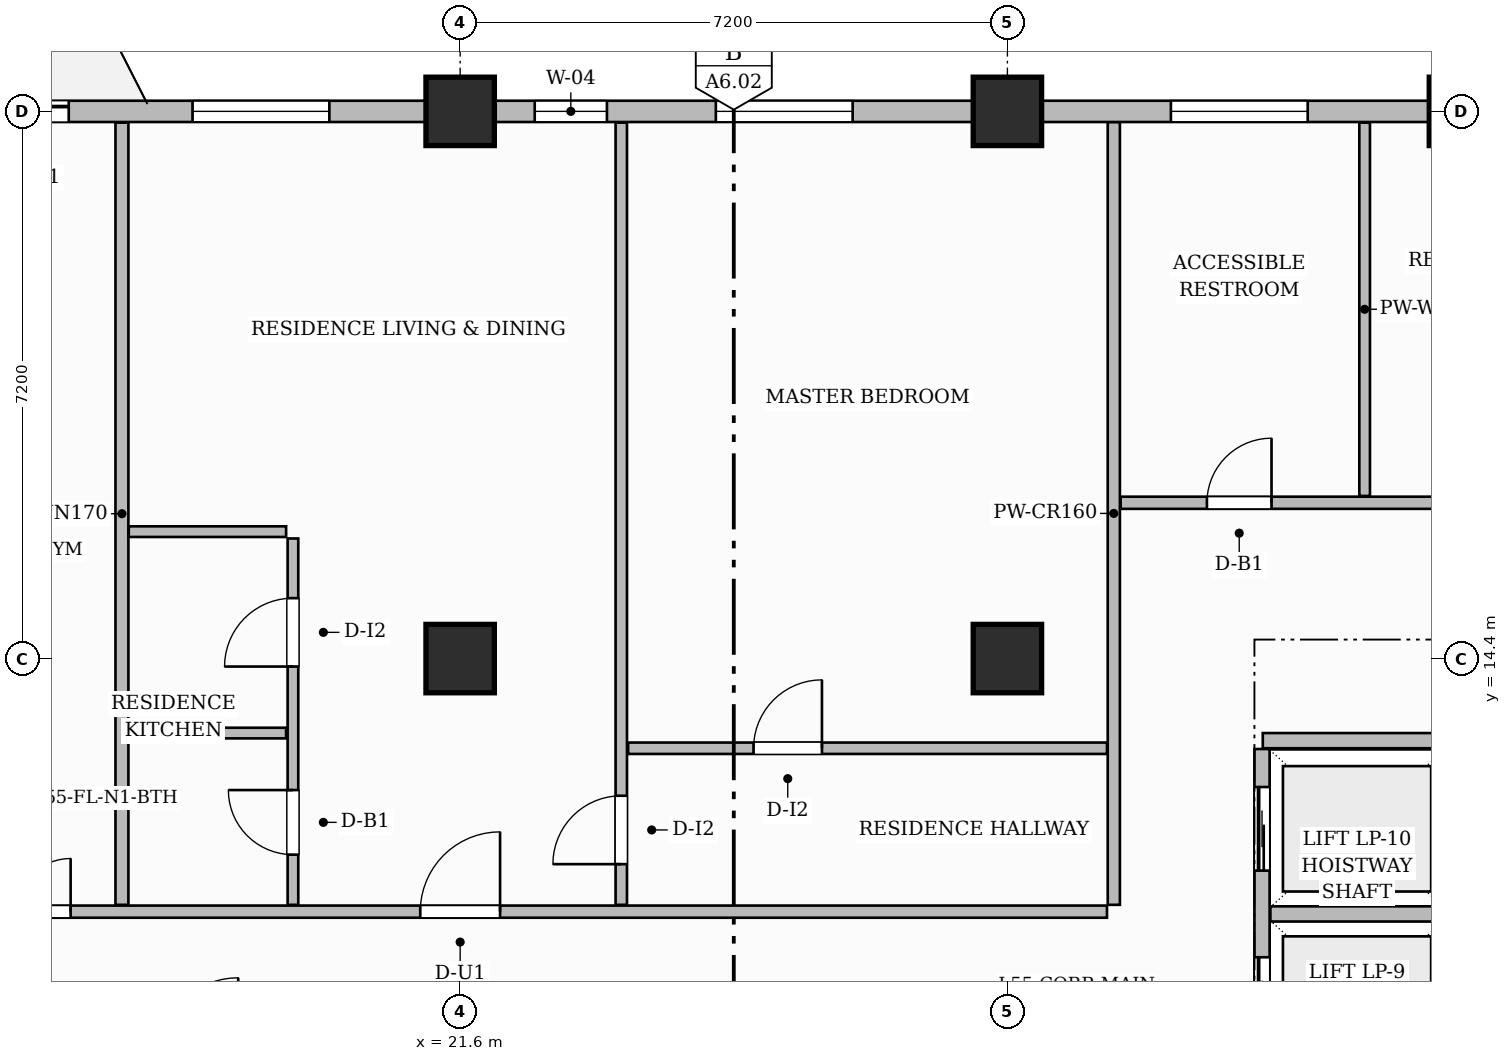
"""IFC4 building model, lengths in metres.
Left out: names, types, materials, properties, quantities, classifications, styles, units other than length and angle.
Written with IfcOpenShell. Run it as: python <this file> out.ifc"""

import sys

from ifc_helpers import new_model, si_unit, direction, frame, frame_2d, origin, origin_2d, place, context, subcontext, project, spatial, rectangle, extrude, source, transform, mapped, element, fill, save


model = new_model("IFC4")
c1 = context("Model", 3, precision=1e-05, world=origin(), true_north=direction((0.0, 1.0)))
c2 = subcontext(c1, "Body", "Model", "MODEL_VIEW")
j1 = project(units=[si_unit("LENGTHUNIT", "METRE"), si_unit("PLANEANGLEUNIT", "RADIAN")], contexts=[c1])
p1 = place(None, origin())
s1 = spatial("IfcSite", under=j1, at=p1, CompositionType="ELEMENT")
p2 = place(p1, origin())
s2 = spatial("IfcBuilding", under=s1, at=p2, CompositionType="ELEMENT")
p3 = place(p2, frame((0.0, 0.0, 221.15)))
s3 = spatial("IfcBuildingStorey", under=s2, at=p3, CompositionType="ELEMENT", Elevation=221.15)
m1 = source(origin(), c2, "Body", "SweptSolid", [
    extrude(rectangle(XDim=0.9, YDim=0.9, at=origin_2d()), origin(), (0.0, 0.0, 1.0), 3.85),
])
for number, where, z_axis, x_axis in (
    (1, (21.6, 14.4, 0.0), (0.0, 0.0, 1.0), (1.0, 0.0, 0.0)),
    (2, (21.6, 21.6, 0.0), (0.0, 0.0, 1.0), (1.0, 0.0, 0.0)),
    (3, (28.8, 14.4, 0.0), (0.0, 0.0, 1.0), (1.0, 0.0, 0.0)),
    (4, (28.8, 21.6, 0.0), (0.0, 0.0, 1.0), (1.0, 0.0, 0.0)),
    (5, (34.8, 21.6, 0.0), (0.0, 0.0, 1.0), (1.0, 0.0, 0.0)),
):
    element("IfcColumn", number, at=place(p3, frame(where, z_axis=z_axis, x_axis=x_axis)), inside=s3, PredefinedType="COLUMN", context=c2, shape_type="MappedRepresentation", body=[
        mapped(m1, transform((0.0, 0.0, 0.0), scale=1.0)),
    ])
p4 = place(p3, frame((32.16, 13.32, 0.0), z_axis=(0.0, 0.0, 1.0), x_axis=(1.0, 0.0, 0.0)))
e6 = element("IfcWall", 6, at=p4, inside=s3, PredefinedType="PARTITIONING", context=c2, shape_type="SweptSolid", body=[
    extrude(rectangle(XDim=2.36, YDim=0.2, at=frame_2d((1.18, 0.0))), origin(), (0.0, 0.0, 1.0), 3.6),
])
p5 = place(p3, frame((32.15, 4.39, 0.0), z_axis=(0.0, 0.0, 1.0), x_axis=(0.0, 1.0, 0.0)))
e7 = element("IfcWall", 7, at=p5, inside=s3, PredefinedType="PARTITIONING", context=c2, shape_type="SweptSolid", body=[
    extrude(rectangle(XDim=8.82, YDim=0.2, at=frame_2d((4.41, 0.0))), origin(), (0.0, 0.0, 1.0), 3.6),
])
p6 = place(p5, frame((0.5, 0.0, 0.0)))
e8 = element("IfcOpeningElement", 8, at=p6, cuts=e7, PredefinedType="OPENING", context=c2, shape_type="SweptSolid", body=[
    extrude(rectangle(XDim=1.1, YDim=2.2, at=frame_2d((0.55, 1.1))), frame((0.0, 0.11, 0.0), z_axis=(0.0, -1.0, 0.0), x_axis=(1.0, 0.0, 0.0)), (0.0, 0.0, 1.0), 0.22),
])
p7 = place(p5, frame((2.74, 0.0, 0.0)))
e9 = element("IfcOpeningElement", 9, at=p7, cuts=e7, PredefinedType="OPENING", context=c2, shape_type="SweptSolid", body=[
    extrude(rectangle(XDim=1.1, YDim=2.2, at=frame_2d((0.55, 1.1))), frame((0.0, 0.11, 0.0), z_axis=(0.0, -1.0, 0.0), x_axis=(1.0, 0.0, 0.0)), (0.0, 0.0, 1.0), 0.22),
])
p8 = place(p5, frame((4.98, 0.0, 0.0)))
e10 = element("IfcOpeningElement", 10, at=p8, cuts=e7, PredefinedType="OPENING", context=c2, shape_type="SweptSolid", body=[
    extrude(rectangle(XDim=1.1, YDim=2.2, at=frame_2d((0.55, 1.1))), frame((0.0, 0.11, 0.0), z_axis=(0.0, -1.0, 0.0), x_axis=(1.0, 0.0, 0.0)), (0.0, 0.0, 1.0), 0.22),
])
p9 = place(p5, frame((7.22, 0.0, 0.0)))
e11 = element("IfcOpeningElement", 11, at=p9, cuts=e7, PredefinedType="OPENING", context=c2, shape_type="SweptSolid", body=[
    extrude(rectangle(XDim=1.1, YDim=2.2, at=frame_2d((0.55, 1.1))), frame((0.0, 0.11, 0.0), z_axis=(0.0, -1.0, 0.0), x_axis=(1.0, 0.0, 0.0)), (0.0, 0.0, 1.0), 0.22),
])
p10 = place(p3, frame((32.26, 11.04, 0.0), z_axis=(0.0, 0.0, 1.0), x_axis=(1.0, 0.0, 0.0)))
e12 = element("IfcWall", 12, at=p10, inside=s3, PredefinedType="PARTITIONING", context=c2, shape_type="SweptSolid", body=[
    extrude(rectangle(XDim=2.23, YDim=0.2, at=frame_2d((1.115, 0.0))), origin(), (0.0, 0.0, 1.0), 3.6),
])
p11 = place(p3, frame((14.548, 11.07, 0.0), z_axis=(0.0, 0.0, 1.0), x_axis=(1.0, 0.0, 0.0)))
e13 = element("IfcWall", 13, at=p11, inside=s3, PredefinedType="PARTITIONING", context=c2, shape_type="SweptSolid", body=[
    extrude(rectangle(XDim=15.562, YDim=0.16, at=frame_2d((7.781, 0.0))), origin(), (0.0, 0.0, 1.0), 3.6),
])
p12 = place(p11, frame((0.527, 0.0, 0.0)))
e14 = element("IfcOpeningElement", 14, at=p12, cuts=e13, PredefinedType="OPENING", context=c2, shape_type="SweptSolid", body=[
    extrude(rectangle(XDim=1.4, YDim=2.35, at=frame_2d((0.7, 1.175))), frame((0.0, 0.09, 0.0), z_axis=(0.0, -1.0, 0.0), x_axis=(1.0, 0.0, 0.0)), (0.0, 0.0, 1.0), 0.18),
])
p13 = place(p11, frame((6.527, 0.0, 0.0)))
e15 = element("IfcOpeningElement", 15, at=p13, cuts=e13, PredefinedType="OPENING", context=c2, shape_type="SweptSolid", body=[
    extrude(rectangle(XDim=1.05, YDim=2.25, at=frame_2d((0.525, 1.125))), frame((0.0, 0.09, 0.0), z_axis=(0.0, -1.0, 0.0), x_axis=(1.0, 0.0, 0.0)), (0.0, 0.0, 1.0), 0.18),
])
p14 = place(p3, frame((30.2, 11.16, 0.0), z_axis=(0.0, 0.0, 1.0), x_axis=(0.0, 1.0, 0.0)))
e16 = element("IfcWall", 16, at=p14, inside=s3, PredefinedType="PARTITIONING", context=c2, shape_type="SweptSolid", body=[
    extrude(rectangle(XDim=10.3, YDim=0.16, at=frame_2d((5.15, 0.0))), origin(), (0.0, 0.0, 1.0), 3.6),
])
p15 = place(p3, frame((30.29, 16.45, 0.0), z_axis=(0.0, 0.0, 1.0), x_axis=(1.0, 0.0, 0.0)))
e17 = element("IfcWall", 17, at=p15, inside=s3, PredefinedType="PARTITIONING", context=c2, shape_type="SweptSolid", body=[
    extrude(rectangle(XDim=19.37, YDim=0.16, at=frame_2d((9.685, 0.0))), origin(), (0.0, 0.0, 1.0), 3.6),
])
p16 = place(p15, frame((1.135, 0.0, 0.0)))
e18 = element("IfcOpeningElement", 18, at=p16, cuts=e17, PredefinedType="OPENING", context=c2, shape_type="SweptSolid", body=[
    extrude(rectangle(XDim=0.85, YDim=2.1, at=frame_2d((0.425, 1.05))), frame((0.0, 0.09, 0.0), z_axis=(0.0, -1.0, 0.0), x_axis=(1.0, 0.0, 0.0)), (0.0, 0.0, 1.0), 0.18),
])
p17 = place(p15, frame((5.71, 0.0, 0.0)))
e19 = element("IfcOpeningElement", 19, at=p17, cuts=e17, PredefinedType="OPENING", context=c2, shape_type="SweptSolid", body=[
    extrude(rectangle(XDim=0.9, YDim=2.15, at=frame_2d((0.45, 1.075))), frame((0.0, 0.09, 0.0), z_axis=(0.0, -1.0, 0.0), x_axis=(1.0, 0.0, 0.0)), (0.0, 0.0, 1.0), 0.18),
])
p18 = place(p15, frame((10.635, 0.0, 0.0)))
e20 = element("IfcOpeningElement", 20, at=p18, cuts=e17, PredefinedType="OPENING", context=c2, shape_type="SweptSolid", body=[
    extrude(rectangle(XDim=0.95, YDim=2.15, at=frame_2d((0.475, 1.075))), frame((0.0, 0.09, 0.0), z_axis=(0.0, -1.0, 0.0), x_axis=(1.0, 0.0, 0.0)), (0.0, 0.0, 1.0), 0.18),
])
p19 = place(p15, frame((16.235, 0.0, 0.0)))
e21 = element("IfcOpeningElement", 21, at=p19, cuts=e17, PredefinedType="OPENING", context=c2, shape_type="SweptSolid", body=[
    extrude(rectangle(XDim=0.95, YDim=2.15, at=frame_2d((0.475, 1.075))), frame((0.0, 0.09, 0.0), z_axis=(0.0, -1.0, 0.0), x_axis=(1.0, 0.0, 0.0)), (0.0, 0.0, 1.0), 0.18),
])
p20 = place(p3, frame((33.5, 16.54, 0.0), z_axis=(0.0, 0.0, 1.0), x_axis=(0.0, 1.0, 0.0)))
e22 = element("IfcWall", 22, at=p20, inside=s3, PredefinedType="PARTITIONING", context=c2, shape_type="SweptSolid", body=[
    extrude(rectangle(XDim=4.912, YDim=0.14, at=frame_2d((2.456, 0.0))), origin(), (0.0, 0.0, 1.0), 3.6),
])
p21 = place(p3, frame((17.15, 11.16, 0.0), z_axis=(0.0, 0.0, 1.0), x_axis=(0.0, 1.0, 0.0)))
e23 = element("IfcWall", 23, at=p21, inside=s3, PredefinedType="PARTITIONING", context=c2, shape_type="SweptSolid", body=[
    extrude(rectangle(XDim=10.292, YDim=0.17, at=frame_2d((5.146, 0.0))), origin(), (0.0, 0.0, 1.0), 3.6),
])
p22 = place(p3, frame((19.4, 11.16, 0.0), z_axis=(0.0, 0.0, 1.0), x_axis=(0.0, 1.0, 0.0)))
e24 = element("IfcWall", 24, at=p22, inside=s3, PredefinedType="PARTITIONING", context=c2, shape_type="SweptSolid", body=[
    extrude(rectangle(XDim=4.82, YDim=0.14, at=frame_2d((2.41, 0.0))), origin(), (0.0, 0.0, 1.0), 3.6),
])
p23 = place(p22, frame((0.66, 0.0, 0.0)))
e25 = element("IfcOpeningElement", 25, at=p23, cuts=e24, PredefinedType="OPENING", context=c2, shape_type="SweptSolid", body=[
    extrude(rectangle(XDim=0.85, YDim=2.1, at=frame_2d((0.425, 1.05))), frame((0.0, 0.08, 0.0), z_axis=(0.0, -1.0, 0.0), x_axis=(1.0, 0.0, 0.0)), (0.0, 0.0, 1.0), 0.16),
])
p24 = place(p22, frame((3.135, 0.0, 0.0)))
e26 = element("IfcOpeningElement", 26, at=p24, cuts=e24, PredefinedType="OPENING", context=c2, shape_type="SweptSolid", body=[
    extrude(rectangle(XDim=0.9, YDim=2.15, at=frame_2d((0.45, 1.075))), frame((0.0, 0.08, 0.0), z_axis=(0.0, -1.0, 0.0), x_axis=(1.0, 0.0, 0.0)), (0.0, 0.0, 1.0), 0.16),
])
for number, where, z_axis, x_axis in (
    (27, (17.24, 13.42, 0.0), (0.0, 0.0, 1.0), (1.0, 0.0, 0.0)),
    (28, (17.24, 16.07, 0.0), (0.0, 0.0, 1.0), (1.0, 0.0, 0.0)),
):
    element("IfcWall", number, at=place(p3, frame(where, z_axis=z_axis, x_axis=x_axis)), inside=s3, PredefinedType="PARTITIONING", context=c2, shape_type="SweptSolid", body=[
        extrude(rectangle(XDim=2.07, YDim=0.14, at=frame_2d((1.035, 0.0))), origin(), (0.0, 0.0, 1.0), 3.6),
    ])
p25 = place(p3, frame((23.72, 11.16, 0.0), z_axis=(0.0, 0.0, 1.0), x_axis=(0.0, 1.0, 0.0)))
e29 = element("IfcWall", 29, at=p25, inside=s3, PredefinedType="PARTITIONING", context=c2, shape_type="SweptSolid", body=[
    extrude(rectangle(XDim=10.292, YDim=0.15, at=frame_2d((5.146, 0.0))), origin(), (0.0, 0.0, 1.0), 3.6),
])
p26 = place(p25, frame((0.535, 0.0, 0.0)))
e30 = element("IfcOpeningElement", 30, at=p26, cuts=e29, PredefinedType="OPENING", context=c2, shape_type="SweptSolid", body=[
    extrude(rectangle(XDim=0.9, YDim=2.15, at=frame_2d((0.45, 1.075))), frame((0.0, 0.085, 0.0), z_axis=(0.0, -1.0, 0.0), x_axis=(1.0, 0.0, 0.0)), (0.0, 0.0, 1.0), 0.17),
])
p27 = place(p3, frame((23.81, 13.22, 0.0), z_axis=(0.0, 0.0, 1.0), x_axis=(1.0, 0.0, 0.0)))
e31 = element("IfcWall", 31, at=p27, inside=s3, PredefinedType="PARTITIONING", context=c2, shape_type="SweptSolid", body=[
    extrude(rectangle(XDim=6.3, YDim=0.15, at=frame_2d((3.15, 0.0))), origin(), (0.0, 0.0, 1.0), 3.6),
])
p28 = place(p27, frame((1.65, 0.0, 0.0)))
e32 = element("IfcOpeningElement", 32, at=p28, cuts=e31, PredefinedType="OPENING", context=c2, shape_type="SweptSolid", body=[
    extrude(rectangle(XDim=0.9, YDim=2.15, at=frame_2d((0.45, 1.075))), frame((0.0, 0.085, 0.0), z_axis=(0.0, -1.0, 0.0), x_axis=(1.0, 0.0, 0.0)), (0.0, 0.0, 1.0), 0.17),
])
p29 = place(p3, frame((14.4, 21.6, 0.0), z_axis=(0.0, 0.0, 1.0), x_axis=(1.0, 0.0, 0.0)))
e33 = element("IfcWall", 33, at=p29, inside=s3, PredefinedType="SOLIDWALL", context=c2, shape_type="SweptSolid", body=[
    extrude(rectangle(XDim=35.4, YDim=0.28, at=frame_2d((17.7, 0.0))), origin(), (0.0, 0.0, 1.0), 3.135),
])
p30 = place(p29, frame((0.85, 0.0, 0.0)))
e34 = element("IfcOpeningElement", 34, at=p30, cuts=e33, PredefinedType="OPENING", context=c2, shape_type="SweptSolid", body=[
    extrude(rectangle(XDim=1.2, YDim=2.2, at=frame_2d((0.6, 1.1))), frame((0.0, 0.15, 0.0), z_axis=(0.0, -1.0, 0.0), x_axis=(1.0, 0.0, 0.0)), (0.0, 0.0, 1.0), 0.3),
])
p31 = place(p29, frame((3.679, 0.0, 0.8)))
e35 = element("IfcOpeningElement", 35, at=p31, cuts=e33, PredefinedType="OPENING", context=c2, shape_type="SweptSolid", body=[
    extrude(rectangle(XDim=1.8, YDim=1.85, at=frame_2d((0.9, 0.925))), frame((0.0, 0.15, 0.0), z_axis=(0.0, -1.0, 0.0), x_axis=(1.0, 0.0, 0.0)), (0.0, 0.0, 1.0), 0.3),
])
p32 = place(p29, frame((8.181, 0.0, 0.8)))
e36 = element("IfcOpeningElement", 36, at=p32, cuts=e33, PredefinedType="OPENING", context=c2, shape_type="SweptSolid", body=[
    extrude(rectangle(XDim=0.95, YDim=1.75, at=frame_2d((0.475, 0.875))), frame((0.0, 0.15, 0.0), z_axis=(0.0, -1.0, 0.0), x_axis=(1.0, 0.0, 0.0)), (0.0, 0.0, 1.0), 0.3),
])
p33 = place(p29, frame((10.564, 0.0, 0.8)))
e37 = element("IfcOpeningElement", 37, at=p33, cuts=e33, PredefinedType="OPENING", context=c2, shape_type="SweptSolid", body=[
    extrude(rectangle(XDim=1.8, YDim=1.85, at=frame_2d((0.9, 0.925))), frame((0.0, 0.15, 0.0), z_axis=(0.0, -1.0, 0.0), x_axis=(1.0, 0.0, 0.0)), (0.0, 0.0, 1.0), 0.3),
])
p34 = place(p29, frame((16.551, 0.0, 0.8)))
e38 = element("IfcOpeningElement", 38, at=p34, cuts=e33, PredefinedType="OPENING", context=c2, shape_type="SweptSolid", body=[
    extrude(rectangle(XDim=1.8, YDim=1.85, at=frame_2d((0.9, 0.925))), frame((0.0, 0.15, 0.0), z_axis=(0.0, -1.0, 0.0), x_axis=(1.0, 0.0, 0.0)), (0.0, 0.0, 1.0), 0.3),
])
p35 = place(p29, frame((22.196, 0.0, 0.8)))
e39 = element("IfcOpeningElement", 39, at=p35, cuts=e33, PredefinedType="OPENING", context=c2, shape_type="SweptSolid", body=[
    extrude(rectangle(XDim=1.8, YDim=1.85, at=frame_2d((0.9, 0.925))), frame((0.0, 0.15, 0.0), z_axis=(0.0, -1.0, 0.0), x_axis=(1.0, 0.0, 0.0)), (0.0, 0.0, 1.0), 0.3),
])
p36 = place(p29, frame((25.329, 0.0, 0.8)))
e40 = element("IfcOpeningElement", 40, at=p36, cuts=e33, PredefinedType="OPENING", context=c2, shape_type="SweptSolid", body=[
    extrude(rectangle(XDim=1.15, YDim=1.8, at=frame_2d((0.575, 0.9))), frame((0.0, 0.15, 0.0), z_axis=(0.0, -1.0, 0.0), x_axis=(1.0, 0.0, 0.0)), (0.0, 0.0, 1.0), 0.3),
])
p37 = place(p29, frame((28.721, 0.0, 0.8)))
e41 = element("IfcOpeningElement", 41, at=p37, cuts=e33, PredefinedType="OPENING", context=c2, shape_type="SweptSolid", body=[
    extrude(rectangle(XDim=0.95, YDim=1.75, at=frame_2d((0.475, 0.875))), frame((0.0, 0.15, 0.0), z_axis=(0.0, -1.0, 0.0), x_axis=(1.0, 0.0, 0.0)), (0.0, 0.0, 1.0), 0.3),
])
p38 = place(p29, frame((31.404, 0.0, 0.8)))
e42 = element("IfcOpeningElement", 42, at=p38, cuts=e33, PredefinedType="OPENING", context=c2, shape_type="SweptSolid", body=[
    extrude(rectangle(XDim=1.8, YDim=1.85, at=frame_2d((0.9, 0.925))), frame((0.0, 0.15, 0.0), z_axis=(0.0, -1.0, 0.0), x_axis=(1.0, 0.0, 0.0)), (0.0, 0.0, 1.0), 0.3),
])
m2 = source(origin(), c2, "Body", "SweptSolid", [
    extrude(rectangle(XDim=0.85, YDim=2.1, at=frame_2d((0.425, 1.05))), frame((0.0, 0.025, 0.0), z_axis=(0.0, -1.0, 0.0), x_axis=(1.0, 0.0, 0.0)), (0.0, 0.0, 1.0), 0.05),
])
p39 = place(p16, origin())
e43 = element("IfcDoor", 43, at=p39, inside=s3, OperationType="SINGLE_SWING_RIGHT", PredefinedType="DOOR", context=c2, shape_type="MappedRepresentation", body=[
    mapped(m2, transform((0.0, 0.0, 0.0), scale=1.0)),
])
fill(e18, e43)
m3 = source(origin(), c2, "Body", "SweptSolid", [
    extrude(rectangle(XDim=1.4, YDim=2.35, at=frame_2d((0.7, 1.175))), frame((0.0, 0.025, 0.0), z_axis=(0.0, -1.0, 0.0), x_axis=(1.0, 0.0, 0.0)), (0.0, 0.0, 1.0), 0.05),
])
p40 = place(p12, origin())
e44 = element("IfcDoor", 44, at=p40, inside=s3, OperationType="DOUBLE_DOOR_SINGLE_SWING", PredefinedType="DOOR", context=c2, shape_type="MappedRepresentation", body=[
    mapped(m3, transform((0.0, 0.0, 0.0), scale=1.0)),
])
fill(e14, e44)
p41 = place(p23, origin())
e45 = element("IfcDoor", 45, at=p41, inside=s3, OperationType="SINGLE_SWING_RIGHT", PredefinedType="DOOR", context=c2, shape_type="MappedRepresentation", body=[
    mapped(m2, transform((0.0, 0.0, 0.0), scale=1.0)),
])
fill(e25, e45)
m4 = source(origin(), c2, "Body", "SweptSolid", [
    extrude(rectangle(XDim=0.9, YDim=2.15, at=frame_2d((0.45, 1.075))), frame((0.0, 0.025, 0.0), z_axis=(0.0, -1.0, 0.0), x_axis=(1.0, 0.0, 0.0)), (0.0, 0.0, 1.0), 0.05),
])
p42 = place(p24, origin())
e46 = element("IfcDoor", 46, at=p42, inside=s3, OperationType="SINGLE_SWING_LEFT", PredefinedType="DOOR", context=c2, shape_type="MappedRepresentation", body=[
    mapped(m4, transform((0.0, 0.0, 0.0), scale=1.0)),
])
fill(e26, e46)
m5 = source(origin(), c2, "Body", "SweptSolid", [
    extrude(rectangle(XDim=1.05, YDim=2.25, at=frame_2d((0.525, 1.125))), frame((0.0, 0.025, 0.0), z_axis=(0.0, -1.0, 0.0), x_axis=(1.0, 0.0, 0.0)), (0.0, 0.0, 1.0), 0.05),
])
p43 = place(p13, origin())
e47 = element("IfcDoor", 47, at=p43, inside=s3, OperationType="SINGLE_SWING_RIGHT", PredefinedType="DOOR", context=c2, shape_type="MappedRepresentation", body=[
    mapped(m5, transform((0.0, 0.0, 0.0), scale=1.0)),
])
fill(e15, e47)
p44 = place(p26, origin())
e48 = element("IfcDoor", 48, at=p44, inside=s3, OperationType="SINGLE_SWING_LEFT", PredefinedType="DOOR", context=c2, shape_type="MappedRepresentation", body=[
    mapped(m4, transform((0.0, 0.0, 0.0), scale=1.0)),
])
fill(e30, e48)
p45 = place(p28, origin())
e49 = element("IfcDoor", 49, at=p45, inside=s3, OperationType="SINGLE_SWING_RIGHT", PredefinedType="DOOR", context=c2, shape_type="MappedRepresentation", body=[
    mapped(m4, transform((0.0, 0.0, 0.0), scale=1.0)),
])
fill(e32, e49)
m6 = source(origin(), c2, "Body", "SweptSolid", [
    extrude(rectangle(XDim=1.1, YDim=2.2, at=frame_2d((0.55, 1.1))), frame((0.0, 0.025, 0.0), z_axis=(0.0, -1.0, 0.0), x_axis=(1.0, 0.0, 0.0)), (0.0, 0.0, 1.0), 0.05),
])
p46 = place(p8, origin())
e50 = element("IfcDoor", 50, at=p46, inside=s3, OperationType="SLIDING_TO_LEFT", PredefinedType="DOOR", context=c2, shape_type="MappedRepresentation", body=[
    mapped(m6, transform((0.0, 0.0, 0.0), scale=1.0)),
])
fill(e10, e50)
p47 = place(p9, origin())
e51 = element("IfcDoor", 51, at=p47, inside=s3, OperationType="SLIDING_TO_LEFT", PredefinedType="DOOR", context=c2, shape_type="MappedRepresentation", body=[
    mapped(m6, transform((0.0, 0.0, 0.0), scale=1.0)),
])
fill(e11, e51)
m7 = source(origin(), c2, "Body", "SweptSolid", [
    extrude(rectangle(XDim=1.2, YDim=2.2, at=frame_2d((0.6, 1.1))), frame((0.0, 0.025, 0.0), z_axis=(0.0, -1.0, 0.0), x_axis=(1.0, 0.0, 0.0)), (0.0, 0.0, 1.0), 0.05),
])
p48 = place(p30, origin())
e52 = element("IfcDoor", 52, at=p48, inside=s3, OperationType="SLIDING_TO_LEFT", PredefinedType="DOOR", context=c2, shape_type="MappedRepresentation", body=[
    mapped(m7, transform((0.0, 0.0, 0.0), scale=1.0)),
])
fill(e34, e52)
m8 = source(origin(), c2, "Body", "SweptSolid", [
    extrude(rectangle(XDim=1.8, YDim=1.85, at=frame_2d((0.9, 0.925))), frame((0.0, 0.03, 0.0), z_axis=(0.0, -1.0, 0.0), x_axis=(1.0, 0.0, 0.0)), (0.0, 0.0, 1.0), 0.06),
])
p49 = place(p31, origin())
e53 = element("IfcWindow", 53, at=p49, inside=s3, PartitioningType="DOUBLE_PANEL_VERTICAL", PredefinedType="WINDOW", context=c2, shape_type="MappedRepresentation", body=[
    mapped(m8, transform((0.0, 0.0, 0.0), scale=1.0)),
])
fill(e35, e53)
m9 = source(origin(), c2, "Body", "SweptSolid", [
    extrude(rectangle(XDim=0.95, YDim=1.75, at=frame_2d((0.475, 0.875))), frame((0.0, 0.03, 0.0), z_axis=(0.0, -1.0, 0.0), x_axis=(1.0, 0.0, 0.0)), (0.0, 0.0, 1.0), 0.06),
])
p50 = place(p32, origin())
e54 = element("IfcWindow", 54, at=p50, inside=s3, PartitioningType="SINGLE_PANEL", PredefinedType="WINDOW", context=c2, shape_type="MappedRepresentation", body=[
    mapped(m9, transform((0.0, 0.0, 0.0), scale=1.0)),
])
fill(e36, e54)
p51 = place(p33, origin())
e55 = element("IfcWindow", 55, at=p51, inside=s3, PartitioningType="DOUBLE_PANEL_VERTICAL", PredefinedType="WINDOW", context=c2, shape_type="MappedRepresentation", body=[
    mapped(m8, transform((0.0, 0.0, 0.0), scale=1.0)),
])
fill(e37, e55)
p52 = place(p34, origin())
e56 = element("IfcWindow", 56, at=p52, inside=s3, PartitioningType="DOUBLE_PANEL_VERTICAL", PredefinedType="WINDOW", context=c2, shape_type="MappedRepresentation", body=[
    mapped(m8, transform((0.0, 0.0, 0.0), scale=1.0)),
])
fill(e38, e56)
save(model, sys.argv[1])
